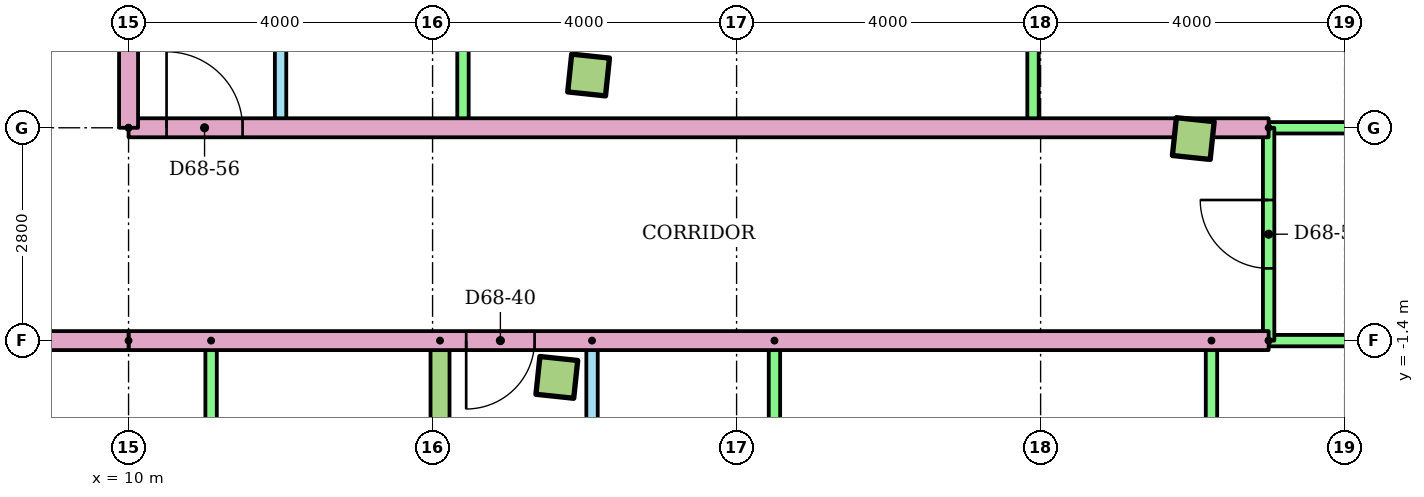
"""IFC4 building model, lengths in metres.
Left out: names, types, materials, properties, quantities, classifications, styles, units other than length and angle.
Written with IfcOpenShell. Run it as: python <this file> out.ifc"""

import sys

from ifc_helpers import new_model, si_unit, direction, frame, frame_2d, origin, origin_2d, place, context, subcontext, project, spatial, rectangle, extrude, element, fill, save


model = new_model("IFC4")
c1 = context("Model", 3, precision=1e-05, world=origin(), true_north=direction((0.0, 1.0)))
c2 = subcontext(c1, "Body", "Model", "MODEL_VIEW")
j1 = project(units=[si_unit("LENGTHUNIT", "METRE"), si_unit("PLANEANGLEUNIT", "RADIAN")], contexts=[c1])
p1 = place(None, origin())
s1 = spatial("IfcSite", under=j1, at=p1, CompositionType="ELEMENT")
p2 = place(p1, origin())
s2 = spatial("IfcBuilding", under=s1, at=p2, CompositionType="ELEMENT")
p3 = place(p2, frame((0.0, 0.0, 262.7)))
s3 = spatial("IfcBuildingStorey", under=s2, at=p3, CompositionType="ELEMENT", Elevation=262.7)
for number, where, z_axis, x_axis in (
    (1, (15.635, -1.884, 0.0), (0.0, 0.0, 1.0), (0.995, -0.105, 0.0)),
    (2, (16.053, 2.094, 0.0), (0.0, 0.0, 1.0), (0.995, -0.105, 0.0)),
    (3, (24.009, 1.258, 0.0), (0.0, 0.0, 1.0), (0.995, -0.105, 0.0)),
):
    element("IfcColumn", number, at=place(p3, frame(where, z_axis=z_axis, x_axis=x_axis)), inside=s3, PredefinedType="COLUMN", context=c2, shape_type="SweptSolid", body=[
        extrude(rectangle(XDim=0.5, YDim=0.5, at=origin_2d()), origin(), (0.0, 0.0, 1.0), 3.2),
    ])
p4 = place(p3, frame((11.086, -1.4, 0.0), z_axis=(0.0, 0.0, 1.0), x_axis=(0.0, -1.0, 0.0)))
e4 = element("IfcWall", 4, at=p4, inside=s3, PredefinedType="PARTITIONING", context=c2, shape_type="SweptSolid", body=[
    extrude(rectangle(XDim=7.484, YDim=0.15, at=frame_2d((3.742, 0.0))), origin(), (0.0, 0.0, 1.0), 2.4),
])
p5 = place(p3, frame((16.098, -1.4, 0.0), z_axis=(0.0, 0.0, 1.0), x_axis=(0.0, -1.0, 0.0)))
e5 = element("IfcWall", 5, at=p5, inside=s3, PredefinedType="PARTITIONING", context=c2, shape_type="SweptSolid", body=[
    extrude(rectangle(XDim=8.982, YDim=0.15, at=frame_2d((4.491, 0.0))), origin(), (0.0, 0.0, 1.0), 2.4),
])
p6 = place(p5, frame((2.05, 0.0, 0.0)))
e6 = element("IfcOpeningElement", 6, at=p6, cuts=e5, PredefinedType="OPENING", context=c2, shape_type="SweptSolid", body=[
    extrude(rectangle(XDim=0.9, YDim=2.1, at=frame_2d((0.45, 1.05))), frame((0.0, 0.085, 0.0), z_axis=(0.0, -1.0, 0.0), x_axis=(1.0, 0.0, 0.0)), (0.0, 0.0, 1.0), 0.17),
])
p7 = place(p5, frame((6.591, 0.0, 0.0)))
e7 = element("IfcOpeningElement", 7, at=p7, cuts=e5, PredefinedType="OPENING", context=c2, shape_type="SweptSolid", body=[
    extrude(rectangle(XDim=0.8, YDim=2.1, at=frame_2d((0.4, 1.05))), frame((0.0, 0.085, 0.0), z_axis=(0.0, -1.0, 0.0), x_axis=(1.0, 0.0, 0.0)), (0.0, 0.0, 1.0), 0.17),
])
for number, where, z_axis, x_axis in (
    (8, (18.498, -1.4, 0.0), (0.0, 0.0, 1.0), (0.0, -1.0, 0.0)),
    (9, (24.248, -1.4, 0.0), (0.0, 0.0, 1.0), (0.0, -1.0, 0.0)),
):
    element("IfcWall", number, at=place(p3, frame(where, z_axis=z_axis, x_axis=x_axis)), inside=s3, PredefinedType="PARTITIONING", context=c2, shape_type="SweptSolid", body=[
        extrude(rectangle(XDim=8.982, YDim=0.15, at=frame_2d((4.491, 0.0))), origin(), (0.0, 0.0, 1.0), 2.4),
    ])
p8 = place(p3, frame((14.098, -1.4, 0.0), z_axis=(0.0, 0.0, 1.0), x_axis=(0.0, -1.0, 0.0)))
e10 = element("IfcWall", 10, at=p8, inside=s3, PredefinedType="PARTITIONING", context=c2, shape_type="SweptSolid", body=[
    extrude(rectangle(XDim=15.013, YDim=0.25, at=frame_2d((7.506, 0.0))), origin(), (0.0, 0.0, 1.0), 2.4),
])
p9 = place(p3, frame((25.0, -1.4, 0.0), z_axis=(0.0, 0.0, 1.0), x_axis=(-1.0, 0.0, 0.0)))
e11 = element("IfcWall", 11, at=p9, inside=s3, PredefinedType="PARTITIONING", context=c2, shape_type="SweptSolid", body=[
    extrude(rectangle(XDim=15.0, YDim=0.25, at=frame_2d((7.5, 0.0))), origin(), (0.0, 0.0, 1.0), 2.4),
])
p10 = place(p9, frame((9.658, 0.0, 0.0)))
e12 = element("IfcOpeningElement", 12, at=p10, cuts=e11, PredefinedType="OPENING", context=c2, shape_type="SweptSolid", body=[
    extrude(rectangle(XDim=0.9, YDim=2.1, at=frame_2d((0.45, 1.05))), frame((0.0, 0.135, 0.0), z_axis=(0.0, -1.0, 0.0), x_axis=(1.0, 0.0, 0.0)), (0.0, 0.0, 1.0), 0.27),
])
p11 = place(p3, frame((30.798, -1.4, 0.0), z_axis=(0.0, 0.0, 1.0), x_axis=(-1.0, 0.0, 0.0)))
e13 = element("IfcWall", 13, at=p11, inside=s3, PredefinedType="PARTITIONING", context=c2, shape_type="SweptSolid", body=[
    extrude(rectangle(XDim=5.798, YDim=0.15, at=frame_2d((2.899, 0.0))), origin(), (0.0, 0.0, 1.0), 2.4),
])
p12 = place(p3, frame((12.0, 12.143, 0.0), z_axis=(0.0, 0.0, 1.0), x_axis=(0.0, -1.0, 0.0)))
e14 = element("IfcWall", 14, at=p12, inside=s3, PredefinedType="PARTITIONING", context=c2, shape_type="SweptSolid", body=[
    extrude(rectangle(XDim=10.743, YDim=0.15, at=frame_2d((5.372, 0.0))), origin(), (0.0, 0.0, 1.0), 2.4),
])
p13 = place(p12, frame((7.293, 0.0, 0.0)))
e15 = element("IfcOpeningElement", 15, at=p13, cuts=e14, PredefinedType="OPENING", context=c2, shape_type="SweptSolid", body=[
    extrude(rectangle(XDim=0.9, YDim=2.1, at=frame_2d((0.45, 1.05))), frame((0.0, 0.085, 0.0), z_axis=(0.0, -1.0, 0.0), x_axis=(1.0, 0.0, 0.0)), (0.0, 0.0, 1.0), 0.17),
])
p14 = place(p12, frame((1.972, 0.0, 0.0)))
e16 = element("IfcOpeningElement", 16, at=p14, cuts=e14, PredefinedType="OPENING", context=c2, shape_type="SweptSolid", body=[
    extrude(rectangle(XDim=0.8, YDim=2.1, at=frame_2d((0.4, 1.05))), frame((0.0, 0.085, 0.0), z_axis=(0.0, -1.0, 0.0), x_axis=(1.0, 0.0, 0.0)), (0.0, 0.0, 1.0), 0.17),
])
for number, where, z_axis, x_axis in (
    (17, (14.4, 12.143, 0.0), (0.0, 0.0, 1.0), (0.0, -1.0, 0.0)),
    (18, (21.9, 12.143, 0.0), (0.0, 0.0, 1.0), (0.0, -1.0, 0.0)),
):
    element("IfcWall", number, at=place(p3, frame(where, z_axis=z_axis, x_axis=x_axis)), inside=s3, PredefinedType="PARTITIONING", context=c2, shape_type="SweptSolid", body=[
        extrude(rectangle(XDim=10.743, YDim=0.15, at=frame_2d((5.372, 0.0))), origin(), (0.0, 0.0, 1.0), 2.4),
    ])
p15 = place(p3, frame((10.0, 1.4, 0.0)))
e19 = element("IfcWall", 19, at=p15, inside=s3, PredefinedType="PARTITIONING", context=c2, shape_type="SweptSolid", body=[
    extrude(rectangle(XDim=15.0, YDim=0.25, at=frame_2d((7.5, 0.0))), origin(), (0.0, 0.0, 1.0), 2.4),
])
p16 = place(p15, frame((0.5, 0.0, 0.0)))
e20 = element("IfcOpeningElement", 20, at=p16, cuts=e19, PredefinedType="OPENING", context=c2, shape_type="SweptSolid", body=[
    extrude(rectangle(XDim=1.0, YDim=2.1, at=frame_2d((0.5, 1.05))), frame((0.0, 0.135, 0.0), z_axis=(0.0, -1.0, 0.0), x_axis=(1.0, 0.0, 0.0)), (0.0, 0.0, 1.0), 0.27),
])
p17 = place(p3, frame((25.0, 1.4, 0.0)))
e21 = element("IfcWall", 21, at=p17, inside=s3, PredefinedType="PARTITIONING", context=c2, shape_type="SweptSolid", body=[
    extrude(rectangle(XDim=6.093, YDim=0.15, at=frame_2d((3.046, 0.0))), origin(), (0.0, 0.0, 1.0), 2.4),
])
p18 = place(p3, frame((25.0, -1.4, 0.0), z_axis=(0.0, 0.0, 1.0), x_axis=(0.0, 1.0, 0.0)))
e22 = element("IfcWall", 22, at=p18, inside=s3, PredefinedType="PARTITIONING", context=c2, shape_type="SweptSolid", body=[
    extrude(rectangle(XDim=2.8, YDim=0.15, at=frame_2d((1.4, 0.0))), origin(), (0.0, 0.0, 1.0), 2.4),
])
p19 = place(p18, frame((0.95, 0.0, 0.0)))
e23 = element("IfcOpeningElement", 23, at=p19, cuts=e22, PredefinedType="OPENING", context=c2, shape_type="SweptSolid", body=[
    extrude(rectangle(XDim=0.9, YDim=2.1, at=frame_2d((0.45, 1.05))), frame((0.0, 0.085, 0.0), z_axis=(0.0, -1.0, 0.0), x_axis=(1.0, 0.0, 0.0)), (0.0, 0.0, 1.0), 0.17),
])
p20 = place(p3, frame((10.0, -1.4, 0.0), z_axis=(0.0, 0.0, 1.0), x_axis=(-1.0, 0.0, 0.0)))
e24 = element("IfcWall", 24, at=p20, inside=s3, PredefinedType="PARTITIONING", context=c2, shape_type="SweptSolid", body=[
    extrude(rectangle(XDim=20.0, YDim=0.25, at=frame_2d((10.0, 0.0))), origin(), (0.0, 0.0, 1.0), 2.4),
])
p21 = place(p20, frame((12.314, 0.0, 0.0)))
e25 = element("IfcOpeningElement", 25, at=p21, cuts=e24, PredefinedType="OPENING", context=c2, shape_type="SweptSolid", body=[
    extrude(rectangle(XDim=1.0, YDim=2.1, at=frame_2d((0.5, 1.05))), frame((0.0, 0.135, 0.0), z_axis=(0.0, -1.0, 0.0), x_axis=(1.0, 0.0, 0.0)), (0.0, 0.0, 1.0), 0.27),
])
p22 = place(p20, frame((10.57, 0.0, 0.0)))
e26 = element("IfcOpeningElement", 26, at=p22, cuts=e24, PredefinedType="OPENING", context=c2, shape_type="SweptSolid", body=[
    extrude(rectangle(XDim=0.9, YDim=2.1, at=frame_2d((0.45, 1.05))), frame((0.0, 0.135, 0.0), z_axis=(0.0, -1.0, 0.0), x_axis=(1.0, 0.0, 0.0)), (0.0, 0.0, 1.0), 0.27),
])
p23 = place(p3, frame((10.0, 1.4, 0.0), z_axis=(0.0, 0.0, 1.0), x_axis=(0.0, 1.0, 0.0)))
e27 = element("IfcWall", 27, at=p23, inside=s3, PredefinedType="PARTITIONING", context=c2, shape_type="SweptSolid", body=[
    extrude(rectangle(XDim=1.6, YDim=0.25, at=frame_2d((0.8, 0.0))), origin(), (0.0, 0.0, 1.0), 2.4),
])
p24 = place(p10, origin())
e28 = element("IfcDoor", 28, at=p24, inside=s3, OperationType="SINGLE_SWING_RIGHT", PredefinedType="DOOR", context=c2, shape_type="SweptSolid", body=[
    extrude(rectangle(XDim=0.9, YDim=2.1, at=frame_2d((0.45, 1.05))), frame((0.0, 0.025, 0.0), z_axis=(0.0, -1.0, 0.0), x_axis=(1.0, 0.0, 0.0)), (0.0, 0.0, 1.0), 0.05),
])
fill(e12, e28)
p25 = place(p16, origin())
e29 = element("IfcDoor", 29, at=p25, inside=s3, OperationType="SINGLE_SWING_LEFT", PredefinedType="DOOR", context=c2, shape_type="SweptSolid", body=[
    extrude(rectangle(XDim=1.0, YDim=2.1, at=frame_2d((0.5, 1.05))), frame((0.0, 0.025, 0.0), z_axis=(0.0, -1.0, 0.0), x_axis=(1.0, 0.0, 0.0)), (0.0, 0.0, 1.0), 0.05),
])
fill(e20, e29)
p26 = place(p19, origin())
e30 = element("IfcDoor", 30, at=p26, inside=s3, OperationType="SINGLE_SWING_RIGHT", PredefinedType="DOOR", context=c2, shape_type="SweptSolid", body=[
    extrude(rectangle(XDim=0.9, YDim=2.1, at=frame_2d((0.45, 1.05))), frame((0.0, 0.025, 0.0), z_axis=(0.0, -1.0, 0.0), x_axis=(1.0, 0.0, 0.0)), (0.0, 0.0, 1.0), 0.05),
])
fill(e23, e30)
save(model, sys.argv[1])
